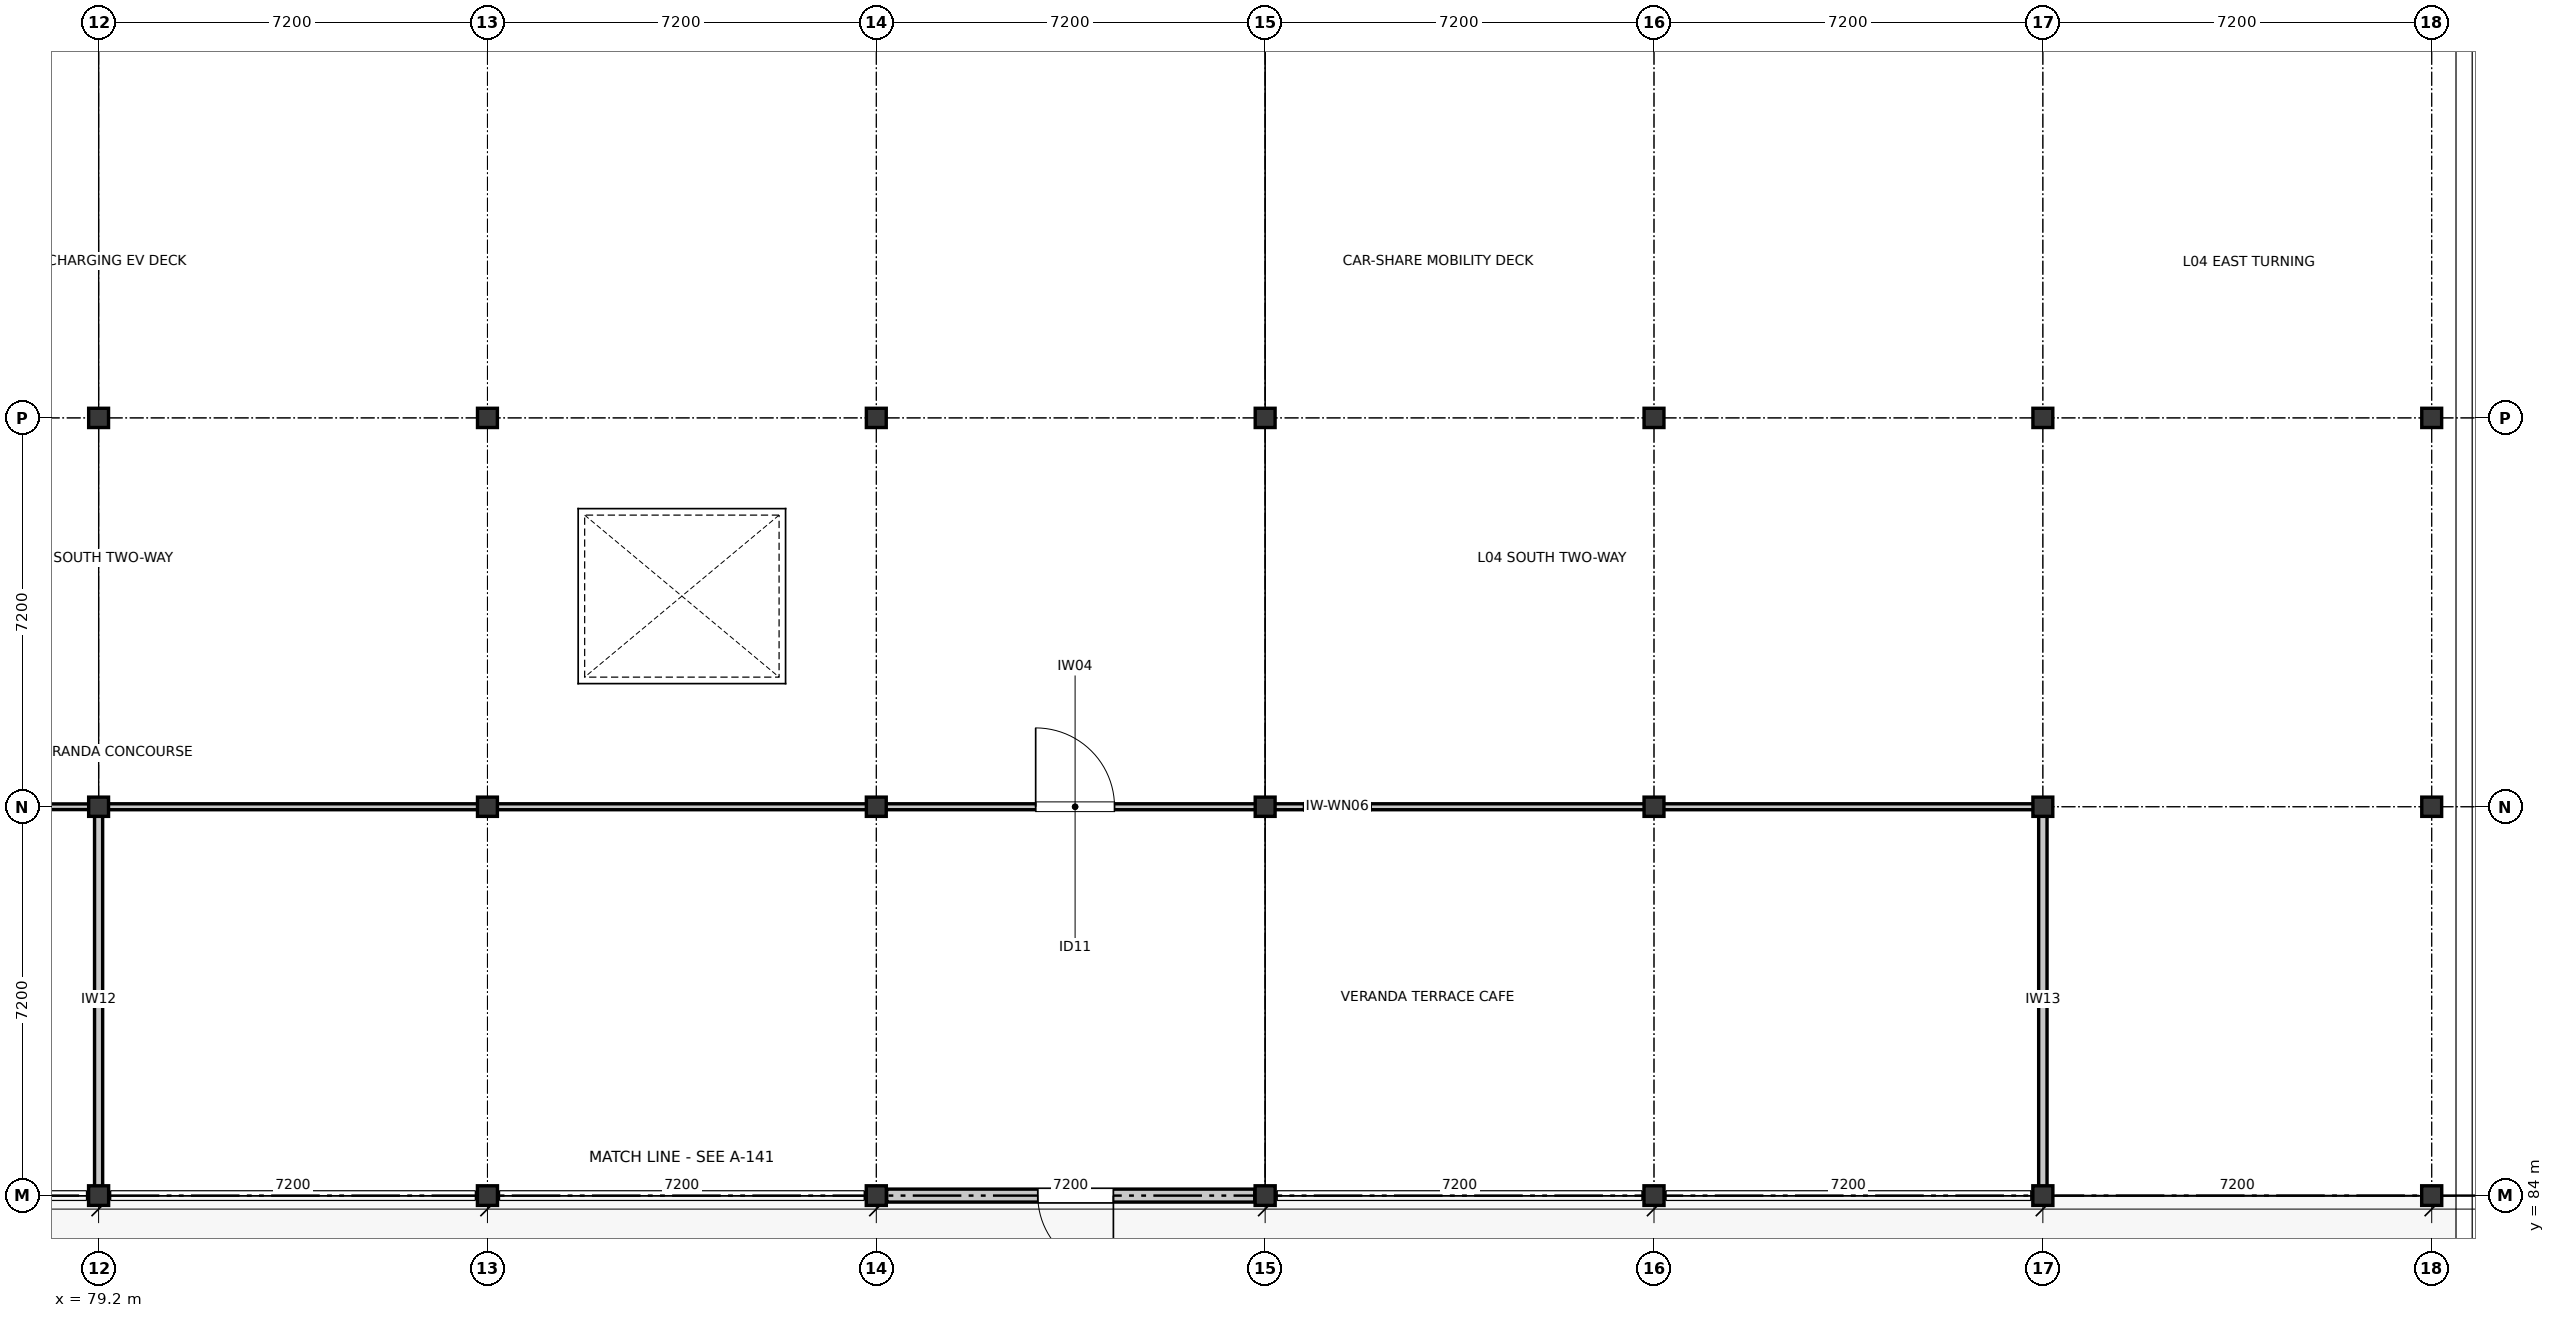
"""IFC4 building model, lengths in metres.
Left out: names, types, materials, properties, quantities, classifications, styles, units other than length and angle.
Written with IfcOpenShell. Run it as: python <this file> out.ifc"""

import sys

from ifc_helpers import new_model, si_unit, direction, frame, frame_2d, origin, origin_2d, place, context, subcontext, project, spatial, rectangle, i_section, extrude, element, fill, save


model = new_model("IFC4")
c1 = context("Model", 3, precision=1e-05, world=origin(), true_north=direction((0.0, 1.0)))
c2 = subcontext(c1, "Body", "Model", "MODEL_VIEW")
j1 = project(units=[si_unit("LENGTHUNIT", "METRE"), si_unit("PLANEANGLEUNIT", "RADIAN")], contexts=[c1])
p1 = place(None, origin())
s1 = spatial("IfcSite", under=j1, at=p1, CompositionType="ELEMENT")
p2 = place(p1, origin())
s2 = spatial("IfcBuilding", under=s1, at=p2, CompositionType="ELEMENT")
p3 = place(p2, frame((0.0, 0.0, 17.1)))
s3 = spatial("IfcBuildingStorey", under=s2, at=p3, CompositionType="ELEMENT", Elevation=17.1)
p4 = place(p3, frame((79.2, 84.0, 0.0), z_axis=(0.0, 0.0, 1.0), x_axis=(1.0, 0.0, 0.0)))
e1 = element("IfcColumn", 1, at=p4, inside=s3, PredefinedType="COLUMN", context=c2, shape_type="SweptSolid", body=[
    extrude(i_section(OverallWidth=0.371, OverallDepth=0.363, WebThickness=0.013, FlangeThickness=0.022, FilletRadius=0.015, at=origin_2d()), origin(), (0.0, 0.0, 1.0), 3.9),
])
for number, where, z_axis, x_axis in (
    (2, (79.2, 91.2, 0.0), (0.0, 0.0, 1.0), (1.0, 0.0, 0.0)),
    (3, (79.2, 98.4, 0.0), (0.0, 0.0, 1.0), (1.0, 0.0, 0.0)),
):
    element("IfcColumn", number, at=place(p3, frame(where, z_axis=z_axis, x_axis=x_axis)), inside=s3, PredefinedType="COLUMN", context=c2, shape_type="SweptSolid", body=[
        extrude(i_section(OverallWidth=0.368, OverallDepth=0.356, WebThickness=0.011, FlangeThickness=0.018, FilletRadius=0.015, at=origin_2d()), origin(), (0.0, 0.0, 1.0), 3.9),
    ])
p5 = place(p3, frame((86.4, 84.0, 0.0), z_axis=(0.0, 0.0, 1.0), x_axis=(1.0, 0.0, 0.0)))
e4 = element("IfcColumn", 4, at=p5, inside=s3, PredefinedType="COLUMN", context=c2, shape_type="SweptSolid", body=[
    extrude(i_section(OverallWidth=0.371, OverallDepth=0.363, WebThickness=0.013, FlangeThickness=0.022, FilletRadius=0.015, at=origin_2d()), origin(), (0.0, 0.0, 1.0), 3.9),
])
for number, where, z_axis, x_axis in (
    (5, (86.4, 91.2, 0.0), (0.0, 0.0, 1.0), (1.0, 0.0, 0.0)),
    (6, (86.4, 98.4, 0.0), (0.0, 0.0, 1.0), (1.0, 0.0, 0.0)),
):
    element("IfcColumn", number, at=place(p3, frame(where, z_axis=z_axis, x_axis=x_axis)), inside=s3, PredefinedType="COLUMN", context=c2, shape_type="SweptSolid", body=[
        extrude(i_section(OverallWidth=0.368, OverallDepth=0.356, WebThickness=0.011, FlangeThickness=0.018, FilletRadius=0.015, at=origin_2d()), origin(), (0.0, 0.0, 1.0), 3.9),
    ])
p6 = place(p3, frame((93.6, 84.0, 0.0), z_axis=(0.0, 0.0, 1.0), x_axis=(1.0, 0.0, 0.0)))
e7 = element("IfcColumn", 7, at=p6, inside=s3, PredefinedType="COLUMN", context=c2, shape_type="SweptSolid", body=[
    extrude(i_section(OverallWidth=0.371, OverallDepth=0.363, WebThickness=0.013, FlangeThickness=0.022, FilletRadius=0.015, at=origin_2d()), origin(), (0.0, 0.0, 1.0), 3.9),
])
for number, where, z_axis, x_axis in (
    (8, (93.6, 91.2, 0.0), (0.0, 0.0, 1.0), (1.0, 0.0, 0.0)),
    (9, (93.6, 98.4, 0.0), (0.0, 0.0, 1.0), (1.0, 0.0, 0.0)),
):
    element("IfcColumn", number, at=place(p3, frame(where, z_axis=z_axis, x_axis=x_axis)), inside=s3, PredefinedType="COLUMN", context=c2, shape_type="SweptSolid", body=[
        extrude(i_section(OverallWidth=0.368, OverallDepth=0.356, WebThickness=0.011, FlangeThickness=0.018, FilletRadius=0.015, at=origin_2d()), origin(), (0.0, 0.0, 1.0), 3.9),
    ])
p7 = place(p3, frame((100.8, 84.0, 0.0), z_axis=(0.0, 0.0, 1.0), x_axis=(1.0, 0.0, 0.0)))
e10 = element("IfcColumn", 10, at=p7, inside=s3, PredefinedType="COLUMN", context=c2, shape_type="SweptSolid", body=[
    extrude(i_section(OverallWidth=0.371, OverallDepth=0.363, WebThickness=0.013, FlangeThickness=0.022, FilletRadius=0.015, at=origin_2d()), origin(), (0.0, 0.0, 1.0), 3.9),
])
for number, where, z_axis, x_axis in (
    (11, (100.8, 91.2, 0.0), (0.0, 0.0, 1.0), (1.0, 0.0, 0.0)),
    (12, (100.8, 98.4, 0.0), (0.0, 0.0, 1.0), (1.0, 0.0, 0.0)),
):
    element("IfcColumn", number, at=place(p3, frame(where, z_axis=z_axis, x_axis=x_axis)), inside=s3, PredefinedType="COLUMN", context=c2, shape_type="SweptSolid", body=[
        extrude(i_section(OverallWidth=0.368, OverallDepth=0.356, WebThickness=0.011, FlangeThickness=0.018, FilletRadius=0.015, at=origin_2d()), origin(), (0.0, 0.0, 1.0), 3.9),
    ])
p8 = place(p3, frame((108.0, 84.0, 0.0), z_axis=(0.0, 0.0, 1.0), x_axis=(1.0, 0.0, 0.0)))
e13 = element("IfcColumn", 13, at=p8, inside=s3, PredefinedType="COLUMN", context=c2, shape_type="SweptSolid", body=[
    extrude(i_section(OverallWidth=0.371, OverallDepth=0.363, WebThickness=0.013, FlangeThickness=0.022, FilletRadius=0.015, at=origin_2d()), origin(), (0.0, 0.0, 1.0), 3.9),
])
for number, where, z_axis, x_axis in (
    (14, (108.0, 91.2, 0.0), (0.0, 0.0, 1.0), (1.0, 0.0, 0.0)),
    (15, (108.0, 98.4, 0.0), (0.0, 0.0, 1.0), (1.0, 0.0, 0.0)),
):
    element("IfcColumn", number, at=place(p3, frame(where, z_axis=z_axis, x_axis=x_axis)), inside=s3, PredefinedType="COLUMN", context=c2, shape_type="SweptSolid", body=[
        extrude(i_section(OverallWidth=0.368, OverallDepth=0.356, WebThickness=0.011, FlangeThickness=0.018, FilletRadius=0.015, at=origin_2d()), origin(), (0.0, 0.0, 1.0), 3.9),
    ])
p9 = place(p3, frame((115.2, 84.0, 0.0), z_axis=(0.0, 0.0, 1.0), x_axis=(1.0, 0.0, 0.0)))
e16 = element("IfcColumn", 16, at=p9, inside=s3, PredefinedType="COLUMN", context=c2, shape_type="SweptSolid", body=[
    extrude(i_section(OverallWidth=0.371, OverallDepth=0.363, WebThickness=0.013, FlangeThickness=0.022, FilletRadius=0.015, at=origin_2d()), origin(), (0.0, 0.0, 1.0), 3.9),
])
for number, where, z_axis, x_axis in (
    (17, (115.2, 91.2, 0.0), (0.0, 0.0, 1.0), (1.0, 0.0, 0.0)),
    (18, (115.2, 98.4, 0.0), (0.0, 0.0, 1.0), (1.0, 0.0, 0.0)),
):
    element("IfcColumn", number, at=place(p3, frame(where, z_axis=z_axis, x_axis=x_axis)), inside=s3, PredefinedType="COLUMN", context=c2, shape_type="SweptSolid", body=[
        extrude(i_section(OverallWidth=0.368, OverallDepth=0.356, WebThickness=0.011, FlangeThickness=0.018, FilletRadius=0.015, at=origin_2d()), origin(), (0.0, 0.0, 1.0), 3.9),
    ])
p10 = place(p3, frame((122.4, 84.0, 0.0), z_axis=(0.0, 0.0, 1.0), x_axis=(1.0, 0.0, 0.0)))
e19 = element("IfcColumn", 19, at=p10, inside=s3, PredefinedType="COLUMN", context=c2, shape_type="SweptSolid", body=[
    extrude(i_section(OverallWidth=0.371, OverallDepth=0.363, WebThickness=0.013, FlangeThickness=0.022, FilletRadius=0.015, at=origin_2d()), origin(), (0.0, 0.0, 1.0), 3.9),
])
for number, where, z_axis, x_axis in (
    (20, (122.4, 91.2, 0.0), (0.0, 0.0, 1.0), (1.0, 0.0, 0.0)),
    (21, (122.4, 98.4, 0.0), (0.0, 0.0, 1.0), (1.0, 0.0, 0.0)),
):
    element("IfcColumn", number, at=place(p3, frame(where, z_axis=z_axis, x_axis=x_axis)), inside=s3, PredefinedType="COLUMN", context=c2, shape_type="SweptSolid", body=[
        extrude(i_section(OverallWidth=0.368, OverallDepth=0.356, WebThickness=0.011, FlangeThickness=0.018, FilletRadius=0.015, at=origin_2d()), origin(), (0.0, 0.0, 1.0), 3.9),
    ])
p11 = place(p3, frame((100.608, 84.0, 0.0), z_axis=(0.0, 0.0, 1.0), x_axis=(-1.0, 0.0, 0.0)))
e22 = element("IfcWall", 22, at=p11, inside=s3, PredefinedType="STANDARD", context=c2, shape_type="SweptSolid", body=[
    extrude(rectangle(XDim=6.816, YDim=0.24, at=frame_2d((3.408, 0.0))), origin(), (0.0, 0.0, 1.0), 2.868),
])
p12 = place(p11, frame((2.618, 0.0, 0.0)))
e23 = element("IfcOpeningElement", 23, at=p12, cuts=e22, PredefinedType="OPENING", context=c2, shape_type="SweptSolid", body=[
    extrude(rectangle(XDim=1.4, YDim=2.15, at=frame_2d((0.7, 1.075))), frame((0.0, 0.13, 0.0), z_axis=(0.0, -1.0, 0.0), x_axis=(1.0, 0.0, 0.0)), (0.0, 0.0, 1.0), 0.26),
])
p13 = place(p3, frame((43.12, 91.2, 0.0), z_axis=(0.0, 0.0, 1.0), x_axis=(1.0, 0.0, 0.0)))
e24 = element("IfcWall", 24, at=p13, inside=s3, PredefinedType="PARTITIONING", context=c2, shape_type="SweptSolid", body=[
    extrude(rectangle(XDim=36.16, YDim=0.105, at=frame_2d((18.08, 0.0))), origin(), (0.0, 0.0, 1.0), 2.863),
])
p14 = place(p13, frame((17.39, 0.0, 0.0)))
e25 = element("IfcOpeningElement", 25, at=p14, cuts=e24, PredefinedType="OPENING", context=c2, shape_type="SweptSolid", body=[
    extrude(rectangle(XDim=1.38, YDim=2.1, at=frame_2d((0.69, 1.05))), frame((0.0, 0.062, 0.0), z_axis=(0.0, -1.0, 0.0), x_axis=(1.0, 0.0, 0.0)), (0.0, 0.0, 1.0), 0.125),
])
p15 = place(p13, frame((20.02, 0.0, 0.95)))
e26 = element("IfcOpeningElement", 26, at=p15, cuts=e24, PredefinedType="OPENING", context=c2, shape_type="SweptSolid", body=[
    extrude(rectangle(XDim=1.0, YDim=1.15, at=frame_2d((0.5, 0.575))), frame((0.0, 0.062, 0.0), z_axis=(0.0, -1.0, 0.0), x_axis=(1.0, 0.0, 0.0)), (0.0, 0.0, 1.0), 0.125),
])
p16 = place(p3, frame((79.282, 91.2, 0.0), z_axis=(0.0, 0.0, 1.0), x_axis=(1.0, 0.0, 0.0)))
e27 = element("IfcWall", 27, at=p16, inside=s3, PredefinedType="PARTITIONING", context=c2, shape_type="SweptSolid", body=[
    extrude(rectangle(XDim=35.998, YDim=0.11, at=frame_2d((17.999, 0.0))), origin(), (0.0, 0.0, 1.0), 2.863),
])
p17 = place(p16, frame((17.269, 0.0, 0.0)))
e28 = element("IfcOpeningElement", 28, at=p17, cuts=e27, PredefinedType="OPENING", context=c2, shape_type="SweptSolid", body=[
    extrude(rectangle(XDim=1.46, YDim=2.1, at=frame_2d((0.73, 1.05))), frame((0.0, 0.065, 0.0), z_axis=(0.0, -1.0, 0.0), x_axis=(1.0, 0.0, 0.0)), (0.0, 0.0, 1.0), 0.13),
])
p18 = place(p16, frame((22.229, 0.0, 0.95)))
e29 = element("IfcOpeningElement", 29, at=p18, cuts=e27, PredefinedType="OPENING", context=c2, shape_type="SweptSolid", body=[
    extrude(rectangle(XDim=1.25, YDim=1.15, at=frame_2d((0.625, 0.575))), frame((0.0, 0.065, 0.0), z_axis=(0.0, -1.0, 0.0), x_axis=(1.0, 0.0, 0.0)), (0.0, 0.0, 1.0), 0.13),
])
p19 = place(p3, frame((79.2, 91.143, 0.0), z_axis=(0.0, 0.0, 1.0), x_axis=(0.0, -1.0, 0.0)))
e30 = element("IfcWall", 30, at=p19, inside=s3, PredefinedType="PARTITIONING", context=c2, shape_type="SweptSolid", body=[
    extrude(rectangle(XDim=7.021, YDim=0.15, at=frame_2d((3.51, 0.0))), origin(), (0.0, 0.0, 1.0), 2.863),
])
p20 = place(p3, frame((115.2, 91.143, 0.0), z_axis=(0.0, 0.0, 1.0), x_axis=(0.0, -1.0, 0.0)))
e31 = element("IfcWall", 31, at=p20, inside=s3, PredefinedType="PARTITIONING", context=c2, shape_type="SweptSolid", body=[
    extrude(rectangle(XDim=7.021, YDim=0.155, at=frame_2d((3.51, 0.0))), origin(), (0.0, 0.0, 1.0), 2.863),
])
p21 = place(p12, origin())
e32 = element("IfcDoor", 32, at=p21, inside=s3, OperationType="SINGLE_SWING_LEFT", PredefinedType="DOOR", context=c2, shape_type="SweptSolid", body=[
    extrude(rectangle(XDim=1.4, YDim=2.15, at=frame_2d((0.7, 1.075))), frame((0.0, 0.025, 0.0), z_axis=(0.0, -1.0, 0.0), x_axis=(1.0, 0.0, 0.0)), (0.0, 0.0, 1.0), 0.05),
])
fill(e23, e32)
p22 = place(p17, origin())
e33 = element("IfcDoor", 33, at=p22, inside=s3, OperationType="SINGLE_SWING_LEFT", PredefinedType="DOOR", context=c2, shape_type="SweptSolid", body=[
    extrude(rectangle(XDim=1.46, YDim=2.1, at=frame_2d((0.73, 1.05))), frame((0.0, 0.025, 0.0), z_axis=(0.0, -1.0, 0.0), x_axis=(1.0, 0.0, 0.0)), (0.0, 0.0, 1.0), 0.05),
])
fill(e28, e33)
p23 = place(p18, origin())
e34 = element("IfcWindow", 34, at=p23, inside=s3, PartitioningType="SINGLE_PANEL", PredefinedType="WINDOW", context=c2, shape_type="SweptSolid", body=[
    extrude(rectangle(XDim=1.25, YDim=1.15, at=frame_2d((0.625, 0.575))), frame((0.0, 0.03, 0.0), z_axis=(0.0, -1.0, 0.0), x_axis=(1.0, 0.0, 0.0)), (0.0, 0.0, 1.0), 0.06),
])
fill(e29, e34)
save(model, sys.argv[1])
